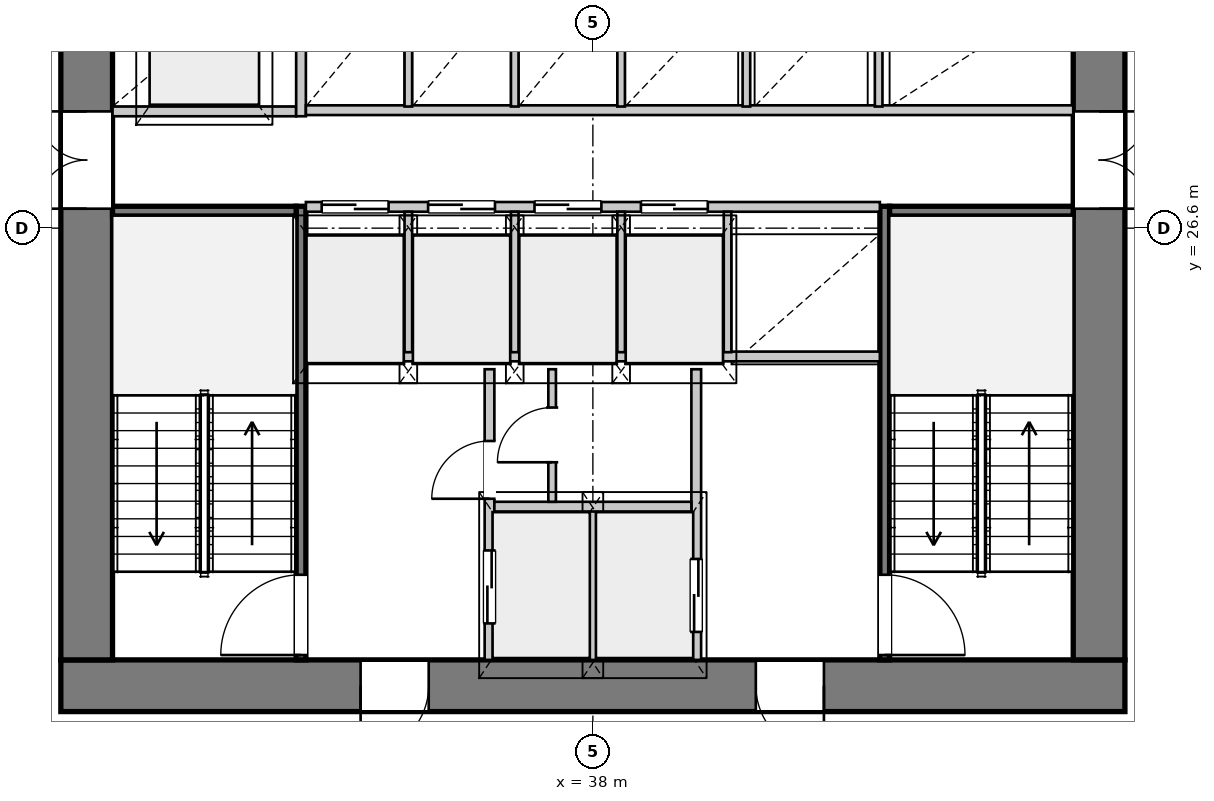
"""IFC4 building model, lengths in metres.
Left out: names, types, materials, properties, quantities, classifications, styles, units other than length and angle.
Written with IfcOpenShell. Run it as: python <this file> out.ifc"""

import sys

from ifc_helpers import new_model, si_unit, direction, frame, frame_2d, origin, place, context, subcontext, project, spatial, rectangle, extrude, source, transform, mapped, element, fill, save


model = new_model("IFC4")
c1 = context("Model", 3, precision=1e-05, world=origin(), true_north=direction((0.0, 1.0)))
c2 = subcontext(c1, "Body", "Model", "MODEL_VIEW")
j1 = project(units=[si_unit("LENGTHUNIT", "METRE"), si_unit("PLANEANGLEUNIT", "RADIAN")], contexts=[c1])
p1 = place(None, origin())
s1 = spatial("IfcSite", under=j1, at=p1, CompositionType="ELEMENT")
p2 = place(p1, origin())
s2 = spatial("IfcBuilding", under=s1, at=p2, CompositionType="ELEMENT")
p3 = place(p2, frame((0.0, 0.0, 47.05)))
s3 = spatial("IfcBuildingStorey", under=s2, at=p3, CompositionType="ELEMENT", Elevation=47.05)
p4 = place(p3, frame((46.75, 19.075, 0.0), z_axis=(0.0, 0.0, 1.0), x_axis=(-1.0, 0.0, 0.0)))
e1 = element("IfcWall", 1, at=p4, inside=s3, PredefinedType="SHEAR", context=c2, shape_type="SweptSolid", body=[
    extrude(rectangle(XDim=17.5, YDim=0.85, at=frame_2d((8.75, 0.0))), origin(), (0.0, 0.0, 1.0), 3.3),
])
p5 = place(p4, frame((4.95, 0.0, 0.0)))
e2 = element("IfcOpeningElement", 2, at=p5, cuts=e1, PredefinedType="OPENING", context=c2, shape_type="SweptSolid", body=[
    extrude(rectangle(XDim=1.12, YDim=2.25, at=frame_2d((0.56, 1.125))), frame((0.0, 0.435, 0.0), z_axis=(0.0, -1.0, 0.0), x_axis=(1.0, 0.0, 0.0)), (0.0, 0.0, 1.0), 0.87),
])
p6 = place(p4, frame((11.45, 0.0, 0.0)))
e3 = element("IfcOpeningElement", 3, at=p6, cuts=e1, PredefinedType="OPENING", context=c2, shape_type="SweptSolid", body=[
    extrude(rectangle(XDim=1.12, YDim=2.25, at=frame_2d((0.56, 1.125))), frame((0.0, 0.435, 0.0), z_axis=(0.0, -1.0, 0.0), x_axis=(1.0, 0.0, 0.0)), (0.0, 0.0, 1.0), 0.87),
])
p7 = place(p3, frame((29.675, 19.5, 0.0), z_axis=(0.0, 0.0, 1.0), x_axis=(0.0, 1.0, 0.0)))
e4 = element("IfcWall", 4, at=p7, inside=s3, PredefinedType="SHEAR", context=c2, shape_type="SweptSolid", body=[
    extrude(rectangle(XDim=14.2, YDim=0.85, at=frame_2d((7.1, 0.0))), origin(), (0.0, 0.0, 1.0), 3.3),
])
p8 = place(p7, frame((7.42, 0.0, 0.0)))
e5 = element("IfcOpeningElement", 5, at=p8, cuts=e4, PredefinedType="OPENING", context=c2, shape_type="SweptSolid", body=[
    extrude(rectangle(XDim=1.6, YDim=2.2, at=frame_2d((0.8, 1.1))), frame((0.0, 0.435, 0.0), z_axis=(0.0, -1.0, 0.0), x_axis=(1.0, 0.0, 0.0)), (0.0, 0.0, 1.0), 0.87),
])
p9 = place(p3, frame((46.325, 33.7, 0.0), z_axis=(0.0, 0.0, 1.0), x_axis=(0.0, -1.0, 0.0)))
e6 = element("IfcWall", 6, at=p9, inside=s3, PredefinedType="SHEAR", context=c2, shape_type="SweptSolid", body=[
    extrude(rectangle(XDim=14.2, YDim=0.85, at=frame_2d((7.1, 0.0))), origin(), (0.0, 0.0, 1.0), 3.3),
])
p10 = place(p9, frame((5.18, 0.0, 0.0)))
e7 = element("IfcOpeningElement", 7, at=p10, cuts=e6, PredefinedType="OPENING", context=c2, shape_type="SweptSolid", body=[
    extrude(rectangle(XDim=1.6, YDim=2.2, at=frame_2d((0.8, 1.1))), frame((0.0, 0.435, 0.0), z_axis=(0.0, -1.0, 0.0), x_axis=(1.0, 0.0, 0.0)), (0.0, 0.0, 1.0), 0.87),
])
p11 = place(p3, frame((33.2, 19.5, 0.0), z_axis=(0.0, 0.0, 1.0), x_axis=(0.0, 1.0, 0.0)))
e8 = element("IfcWall", 8, at=p11, inside=s3, PredefinedType="PARTITIONING", context=c2, shape_type="SweptSolid", body=[
    extrude(rectangle(XDim=7.46, YDim=0.16, at=frame_2d((3.73, 0.0))), origin(), (0.0, 0.0, 1.0), 3.3),
])
p12 = place(p11, frame((0.08, 0.0, 0.0)))
e9 = element("IfcOpeningElement", 9, at=p12, cuts=e8, PredefinedType="OPENING", context=c2, shape_type="SweptSolid", body=[
    extrude(rectangle(XDim=1.32, YDim=2.2, at=frame_2d((0.66, 1.1))), frame((0.0, 0.09, 0.0), z_axis=(0.0, -1.0, 0.0), x_axis=(1.0, 0.0, 0.0)), (0.0, 0.0, 1.0), 0.18),
])
p13 = place(p3, frame((30.1, 26.88, 0.0), z_axis=(0.0, 0.0, 1.0), x_axis=(1.0, 0.0, 0.0)))
e10 = element("IfcWall", 10, at=p13, inside=s3, PredefinedType="PARTITIONING", context=c2, shape_type="SweptSolid", body=[
    extrude(rectangle(XDim=3.02, YDim=0.16, at=frame_2d((1.51, 0.0))), origin(), (0.0, 0.0, 1.0), 3.3),
])
p14 = place(p3, frame((42.8, 26.96, 0.0), z_axis=(0.0, 0.0, 1.0), x_axis=(0.0, -1.0, 0.0)))
e11 = element("IfcWall", 11, at=p14, inside=s3, PredefinedType="PARTITIONING", context=c2, shape_type="SweptSolid", body=[
    extrude(rectangle(XDim=7.46, YDim=0.16, at=frame_2d((3.73, 0.0))), origin(), (0.0, 0.0, 1.0), 3.3),
])
p15 = place(p14, frame((6.06, 0.0, 0.0)))
e12 = element("IfcOpeningElement", 12, at=p15, cuts=e11, PredefinedType="OPENING", context=c2, shape_type="SweptSolid", body=[
    extrude(rectangle(XDim=1.32, YDim=2.2, at=frame_2d((0.66, 1.1))), frame((0.0, 0.09, 0.0), z_axis=(0.0, -1.0, 0.0), x_axis=(1.0, 0.0, 0.0)), (0.0, 0.0, 1.0), 0.18),
])
p16 = place(p3, frame((42.88, 26.88, 0.0), z_axis=(0.0, 0.0, 1.0), x_axis=(1.0, 0.0, 0.0)))
e13 = element("IfcWall", 13, at=p16, inside=s3, PredefinedType="PARTITIONING", context=c2, shape_type="SweptSolid", body=[
    extrude(rectangle(XDim=3.02, YDim=0.16, at=frame_2d((1.51, 0.0))), origin(), (0.0, 0.0, 1.0), 3.3),
])
p17 = place(p3, frame((36.3, 19.5, 0.0), z_axis=(0.0, 0.0, 1.0), x_axis=(0.0, 1.0, 0.0)))
e14 = element("IfcWall", 14, at=p17, inside=s3, PredefinedType="PARTITIONING", context=c2, shape_type="SweptSolid", body=[
    extrude(rectangle(XDim=4.78, YDim=0.16, at=frame_2d((2.39, 0.0))), origin(), (0.0, 0.0, 1.0), 3.3),
])
p18 = place(p17, frame((0.6, 0.0, 0.0)))
e15 = element("IfcOpeningElement", 15, at=p18, cuts=e14, PredefinedType="OPENING", context=c2, shape_type="SweptSolid", body=[
    extrude(rectangle(XDim=1.2, YDim=2.2, at=frame_2d((0.6, 1.1))), frame((0.0, 0.09, 0.0), z_axis=(0.0, -1.0, 0.0), x_axis=(1.0, 0.0, 0.0)), (0.0, 0.0, 1.0), 0.18),
])
p19 = place(p17, frame((2.65, 0.0, 0.0)))
e16 = element("IfcOpeningElement", 16, at=p19, cuts=e14, PredefinedType="OPENING", context=c2, shape_type="SweptSolid", body=[
    extrude(rectangle(XDim=0.95, YDim=2.1, at=frame_2d((0.475, 1.05))), frame((0.0, 0.09, 0.0), z_axis=(0.0, -1.0, 0.0), x_axis=(1.0, 0.0, 0.0)), (0.0, 0.0, 1.0), 0.18),
])
p20 = place(p3, frame((39.7, 24.28, 0.0), z_axis=(0.0, 0.0, 1.0), x_axis=(0.0, -1.0, 0.0)))
e17 = element("IfcWall", 17, at=p20, inside=s3, PredefinedType="PARTITIONING", context=c2, shape_type="SweptSolid", body=[
    extrude(rectangle(XDim=4.78, YDim=0.16, at=frame_2d((2.39, 0.0))), origin(), (0.0, 0.0, 1.0), 3.3),
])
p21 = place(p20, frame((3.12, 0.0, 0.0)))
e18 = element("IfcOpeningElement", 18, at=p21, cuts=e17, PredefinedType="OPENING", context=c2, shape_type="SweptSolid", body=[
    extrude(rectangle(XDim=1.2, YDim=2.2, at=frame_2d((0.6, 1.1))), frame((0.0, 0.09, 0.0), z_axis=(0.0, -1.0, 0.0), x_axis=(1.0, 0.0, 0.0)), (0.0, 0.0, 1.0), 0.18),
])
p22 = place(p3, frame((38.0, 19.5, 0.0), z_axis=(0.0, 0.0, 1.0), x_axis=(0.0, 1.0, 0.0)))
e19 = element("IfcWall", 19, at=p22, inside=s3, PredefinedType="PARTITIONING", context=c2, shape_type="SweptSolid", body=[
    extrude(rectangle(XDim=2.46, YDim=0.125, at=frame_2d((1.23, 0.0))), origin(), (0.0, 0.0, 1.0), 3.3),
])
p23 = place(p3, frame((36.38, 22.02, 0.0), z_axis=(0.0, 0.0, 1.0), x_axis=(1.0, 0.0, 0.0)))
e20 = element("IfcWall", 20, at=p23, inside=s3, PredefinedType="PARTITIONING", context=c2, shape_type="SweptSolid", body=[
    extrude(rectangle(XDim=3.24, YDim=0.16, at=frame_2d((1.62, 0.0))), origin(), (0.0, 0.0, 1.0), 3.3),
])
p24 = place(p3, frame((33.28, 24.49, 0.0), z_axis=(0.0, 0.0, 1.0), x_axis=(1.0, 0.0, 0.0)))
e21 = element("IfcWall", 21, at=p24, inside=s3, PredefinedType="PARTITIONING", context=c2, shape_type="SweptSolid", body=[
    extrude(rectangle(XDim=9.44, YDim=0.16, at=frame_2d((4.72, 0.0))), origin(), (0.0, 0.0, 1.0), 3.3),
])
p25 = place(p3, frame((37.33, 22.1, 0.0), z_axis=(0.0, 0.0, 1.0), x_axis=(0.0, 1.0, 0.0)))
e22 = element("IfcWall", 22, at=p25, inside=s3, PredefinedType="PARTITIONING", context=c2, shape_type="SweptSolid", body=[
    extrude(rectangle(XDim=2.18, YDim=0.125, at=frame_2d((1.09, 0.0))), origin(), (0.0, 0.0, 1.0), 3.3),
])
p26 = place(p25, frame((0.65, 0.0, 0.0)))
e23 = element("IfcOpeningElement", 23, at=p26, cuts=e22, PredefinedType="OPENING", context=c2, shape_type="SweptSolid", body=[
    extrude(rectangle(XDim=0.9, YDim=2.1, at=frame_2d((0.45, 1.05))), frame((0.0, 0.073, 0.0), z_axis=(0.0, -1.0, 0.0), x_axis=(1.0, 0.0, 0.0)), (0.0, 0.0, 1.0), 0.145),
])
p27 = place(p3, frame((30.1, 28.52, 0.0), z_axis=(0.0, 0.0, 1.0), x_axis=(1.0, 0.0, 0.0)))
e24 = element("IfcWall", 24, at=p27, inside=s3, PredefinedType="PARTITIONING", context=c2, shape_type="SweptSolid", body=[
    extrude(rectangle(XDim=3.02, YDim=0.16, at=frame_2d((1.51, 0.0))), origin(), (0.0, 0.0, 1.0), 3.3),
])
p28 = place(p3, frame((33.2, 28.44, 0.0), z_axis=(0.0, 0.0, 1.0), x_axis=(0.0, 1.0, 0.0)))
e25 = element("IfcWall", 25, at=p28, inside=s3, PredefinedType="PARTITIONING", context=c2, shape_type="SweptSolid", body=[
    extrude(rectangle(XDim=5.26, YDim=0.16, at=frame_2d((2.63, 0.0))), origin(), (0.0, 0.0, 1.0), 3.3),
])
p29 = place(p3, frame((33.28, 26.95, 0.0), z_axis=(0.0, 0.0, 1.0), x_axis=(1.0, 0.0, 0.0)))
e26 = element("IfcWall", 26, at=p29, inside=s3, PredefinedType="PARTITIONING", context=c2, shape_type="SweptSolid", body=[
    extrude(rectangle(XDim=9.44, YDim=0.16, at=frame_2d((4.72, 0.0))), origin(), (0.0, 0.0, 1.0), 3.3),
])
p30 = place(p29, frame((0.26, 0.0, 0.0)))
e27 = element("IfcOpeningElement", 27, at=p30, cuts=e26, PredefinedType="OPENING", context=c2, shape_type="SweptSolid", body=[
    extrude(rectangle(XDim=1.1, YDim=2.2, at=frame_2d((0.55, 1.1))), frame((0.0, 0.09, 0.0), z_axis=(0.0, -1.0, 0.0), x_axis=(1.0, 0.0, 0.0)), (0.0, 0.0, 1.0), 0.18),
])
p31 = place(p29, frame((2.01, 0.0, 0.0)))
e28 = element("IfcOpeningElement", 28, at=p31, cuts=e26, PredefinedType="OPENING", context=c2, shape_type="SweptSolid", body=[
    extrude(rectangle(XDim=1.1, YDim=2.2, at=frame_2d((0.55, 1.1))), frame((0.0, 0.09, 0.0), z_axis=(0.0, -1.0, 0.0), x_axis=(1.0, 0.0, 0.0)), (0.0, 0.0, 1.0), 0.18),
])
p32 = place(p29, frame((3.76, 0.0, 0.0)))
e29 = element("IfcOpeningElement", 29, at=p32, cuts=e26, PredefinedType="OPENING", context=c2, shape_type="SweptSolid", body=[
    extrude(rectangle(XDim=1.1, YDim=2.2, at=frame_2d((0.55, 1.1))), frame((0.0, 0.09, 0.0), z_axis=(0.0, -1.0, 0.0), x_axis=(1.0, 0.0, 0.0)), (0.0, 0.0, 1.0), 0.18),
])
p33 = place(p29, frame((5.51, 0.0, 0.0)))
e30 = element("IfcOpeningElement", 30, at=p33, cuts=e26, PredefinedType="OPENING", context=c2, shape_type="SweptSolid", body=[
    extrude(rectangle(XDim=1.1, YDim=2.2, at=frame_2d((0.55, 1.1))), frame((0.0, 0.09, 0.0), z_axis=(0.0, -1.0, 0.0), x_axis=(1.0, 0.0, 0.0)), (0.0, 0.0, 1.0), 0.18),
])
for number, where, z_axis, x_axis in (
    (31, (34.965, 24.56, 0.0), (0.0, 0.0, 1.0), (0.0, 1.0, 0.0)),
    (32, (36.715, 24.56, 0.0), (0.0, 0.0, 1.0), (0.0, 1.0, 0.0)),
    (33, (38.465, 24.56, 0.0), (0.0, 0.0, 1.0), (0.0, 1.0, 0.0)),
    (34, (40.215, 24.56, 0.0), (0.0, 0.0, 1.0), (0.0, 1.0, 0.0)),
):
    element("IfcWall", number, at=place(p3, frame(where, z_axis=z_axis, x_axis=x_axis)), inside=s3, PredefinedType="PARTITIONING", context=c2, shape_type="SweptSolid", body=[
        extrude(rectangle(XDim=2.31, YDim=0.125, at=frame_2d((1.155, 0.0))), origin(), (0.0, 0.0, 1.0), 3.3),
    ])
p34 = place(p3, frame((33.28, 28.54, 0.0), z_axis=(0.0, 0.0, 1.0), x_axis=(1.0, 0.0, 0.0)))
e35 = element("IfcWall", 35, at=p34, inside=s3, PredefinedType="PARTITIONING", context=c2, shape_type="SweptSolid", body=[
    extrude(rectangle(XDim=12.62, YDim=0.16, at=frame_2d((6.31, 0.0))), origin(), (0.0, 0.0, 1.0), 3.3),
])
for number, where, z_axis, x_axis in (
    (36, (34.965, 28.6, 0.0), (0.0, 0.0, 1.0), (0.0, 1.0, 0.0)),
    (37, (36.715, 28.6, 0.0), (0.0, 0.0, 1.0), (0.0, 1.0, 0.0)),
    (38, (38.465, 28.6, 0.0), (0.0, 0.0, 1.0), (0.0, 1.0, 0.0)),
    (39, (40.525, 28.6, 0.0), (0.0, 0.0, 1.0), (0.0, 1.0, 0.0)),
    (40, (42.7, 28.6, 0.0), (0.0, 0.0, 1.0), (0.0, 1.0, 0.0)),
):
    element("IfcWall", number, at=place(p3, frame(where, z_axis=z_axis, x_axis=x_axis)), inside=s3, PredefinedType="PARTITIONING", context=c2, shape_type="SweptSolid", body=[
        extrude(rectangle(XDim=1.92, YDim=0.125, at=frame_2d((0.96, 0.0))), origin(), (0.0, 0.0, 1.0), 3.3),
    ])
m1 = source(origin(), c2, "Body", "SweptSolid", [
    extrude(rectangle(XDim=1.12, YDim=2.25, at=frame_2d((0.56, 1.125))), frame((0.0, 0.025, 0.0), z_axis=(0.0, -1.0, 0.0), x_axis=(1.0, 0.0, 0.0)), (0.0, 0.0, 1.0), 0.05),
])
p35 = place(p5, origin())
e41 = element("IfcDoor", 41, at=p35, inside=s3, OperationType="SINGLE_SWING_LEFT", PredefinedType="DOOR", context=c2, shape_type="MappedRepresentation", body=[
    mapped(m1, transform((0.0, 0.0, 0.0), x_axis=(1.0, 0.0, 0.0), y_axis=(0.0, 1.0, 0.0), z_axis=(0.0, 0.0, 1.0), scale=1.0)),
])
fill(e2, e41)
p36 = place(p6, origin())
e42 = element("IfcDoor", 42, at=p36, inside=s3, OperationType="SINGLE_SWING_RIGHT", PredefinedType="DOOR", context=c2, shape_type="MappedRepresentation", body=[
    mapped(m1, transform((0.0, 0.0, 0.0), x_axis=(1.0, 0.0, 0.0), y_axis=(0.0, 1.0, 0.0), z_axis=(0.0, 0.0, 1.0), scale=1.0)),
])
fill(e3, e42)
m2 = source(origin(), c2, "Body", "SweptSolid", [
    extrude(rectangle(XDim=1.6, YDim=2.2, at=frame_2d((0.8, 1.1))), frame((0.0, 0.025, 0.0), z_axis=(0.0, -1.0, 0.0), x_axis=(1.0, 0.0, 0.0)), (0.0, 0.0, 1.0), 0.05),
])
p37 = place(p8, origin())
e43 = element("IfcDoor", 43, at=p37, inside=s3, OperationType="DOUBLE_DOOR_SINGLE_SWING", PredefinedType="DOOR", context=c2, shape_type="MappedRepresentation", body=[
    mapped(m2, transform((0.0, 0.0, 0.0), x_axis=(1.0, 0.0, 0.0), y_axis=(0.0, 1.0, 0.0), z_axis=(0.0, 0.0, 1.0), scale=1.0)),
])
fill(e5, e43)
p38 = place(p10, origin())
e44 = element("IfcDoor", 44, at=p38, inside=s3, OperationType="DOUBLE_DOOR_SINGLE_SWING", PredefinedType="DOOR", context=c2, shape_type="MappedRepresentation", body=[
    mapped(m2, transform((0.0, 0.0, 0.0), x_axis=(1.0, 0.0, 0.0), y_axis=(0.0, 1.0, 0.0), z_axis=(0.0, 0.0, 1.0), scale=1.0)),
])
fill(e7, e44)
m3 = source(origin(), c2, "Body", "SweptSolid", [
    extrude(rectangle(XDim=1.32, YDim=2.2, at=frame_2d((0.66, 1.1))), frame((0.0, 0.025, 0.0), z_axis=(0.0, -1.0, 0.0), x_axis=(1.0, 0.0, 0.0)), (0.0, 0.0, 1.0), 0.05),
])
p39 = place(p12, origin())
e45 = element("IfcDoor", 45, at=p39, inside=s3, OperationType="SINGLE_SWING_LEFT", PredefinedType="DOOR", context=c2, shape_type="MappedRepresentation", body=[
    mapped(m3, transform((0.0, 0.0, 0.0), x_axis=(1.0, 0.0, 0.0), y_axis=(0.0, 1.0, 0.0), z_axis=(0.0, 0.0, 1.0), scale=1.0)),
])
fill(e9, e45)
p40 = place(p15, origin())
e46 = element("IfcDoor", 46, at=p40, inside=s3, OperationType="SINGLE_SWING_RIGHT", PredefinedType="DOOR", context=c2, shape_type="MappedRepresentation", body=[
    mapped(m3, transform((0.0, 0.0, 0.0), x_axis=(1.0, 0.0, 0.0), y_axis=(0.0, 1.0, 0.0), z_axis=(0.0, 0.0, 1.0), scale=1.0)),
])
fill(e12, e46)
m4 = source(origin(), c2, "Body", "SweptSolid", [
    extrude(rectangle(XDim=1.2, YDim=2.2, at=frame_2d((0.6, 1.1))), frame((0.0, 0.025, 0.0), z_axis=(0.0, -1.0, 0.0), x_axis=(1.0, 0.0, 0.0)), (0.0, 0.0, 1.0), 0.05),
])
p41 = place(p18, origin())
e47 = element("IfcDoor", 47, at=p41, inside=s3, OperationType="DOUBLE_DOOR_SLIDING", PredefinedType="DOOR", context=c2, shape_type="MappedRepresentation", body=[
    mapped(m4, transform((0.0, 0.0, 0.0), x_axis=(1.0, 0.0, 0.0), y_axis=(0.0, 1.0, 0.0), z_axis=(0.0, 0.0, 1.0), scale=1.0)),
])
fill(e15, e47)
m5 = source(origin(), c2, "Body", "SweptSolid", [
    extrude(rectangle(XDim=0.95, YDim=2.1, at=frame_2d((0.475, 1.05))), frame((0.0, 0.025, 0.0), z_axis=(0.0, -1.0, 0.0), x_axis=(1.0, 0.0, 0.0)), (0.0, 0.0, 1.0), 0.05),
])
p42 = place(p19, origin())
e48 = element("IfcDoor", 48, at=p42, inside=s3, OperationType="SINGLE_SWING_LEFT", PredefinedType="DOOR", context=c2, shape_type="MappedRepresentation", body=[
    mapped(m5, transform((0.0, 0.0, 0.0), x_axis=(1.0, 0.0, 0.0), y_axis=(0.0, 1.0, 0.0), z_axis=(0.0, 0.0, 1.0), scale=1.0)),
])
fill(e16, e48)
m6 = source(origin(), c2, "Body", "SweptSolid", [
    extrude(rectangle(XDim=0.9, YDim=2.1, at=frame_2d((0.45, 1.05))), frame((0.0, 0.025, 0.0), z_axis=(0.0, -1.0, 0.0), x_axis=(1.0, 0.0, 0.0)), (0.0, 0.0, 1.0), 0.05),
])
p43 = place(p26, origin())
e49 = element("IfcDoor", 49, at=p43, inside=s3, OperationType="SINGLE_SWING_LEFT", PredefinedType="DOOR", context=c2, shape_type="MappedRepresentation", body=[
    mapped(m6, transform((0.0, 0.0, 0.0), x_axis=(1.0, 0.0, 0.0), y_axis=(0.0, 1.0, 0.0), z_axis=(0.0, 0.0, 1.0), scale=1.0)),
])
fill(e23, e49)
p44 = place(p21, origin())
e50 = element("IfcDoor", 50, at=p44, inside=s3, OperationType="DOUBLE_DOOR_SLIDING", PredefinedType="DOOR", context=c2, shape_type="MappedRepresentation", body=[
    mapped(m4, transform((0.0, 0.0, 0.0), x_axis=(1.0, 0.0, 0.0), y_axis=(0.0, 1.0, 0.0), z_axis=(0.0, 0.0, 1.0), scale=1.0)),
])
fill(e18, e50)
m7 = source(origin(), c2, "Body", "SweptSolid", [
    extrude(rectangle(XDim=1.1, YDim=2.2, at=frame_2d((0.55, 1.1))), frame((0.0, 0.025, 0.0), z_axis=(0.0, -1.0, 0.0), x_axis=(1.0, 0.0, 0.0)), (0.0, 0.0, 1.0), 0.05),
])
p45 = place(p30, origin())
e51 = element("IfcDoor", 51, at=p45, inside=s3, OperationType="DOUBLE_DOOR_SLIDING", PredefinedType="DOOR", context=c2, shape_type="MappedRepresentation", body=[
    mapped(m7, transform((0.0, 0.0, 0.0), x_axis=(1.0, 0.0, 0.0), y_axis=(0.0, 1.0, 0.0), z_axis=(0.0, 0.0, 1.0), scale=1.0)),
])
fill(e27, e51)
p46 = place(p31, origin())
e52 = element("IfcDoor", 52, at=p46, inside=s3, OperationType="DOUBLE_DOOR_SLIDING", PredefinedType="DOOR", context=c2, shape_type="MappedRepresentation", body=[
    mapped(m7, transform((0.0, 0.0, 0.0), x_axis=(1.0, 0.0, 0.0), y_axis=(0.0, 1.0, 0.0), z_axis=(0.0, 0.0, 1.0), scale=1.0)),
])
fill(e28, e52)
p47 = place(p32, origin())
e53 = element("IfcDoor", 53, at=p47, inside=s3, OperationType="DOUBLE_DOOR_SLIDING", PredefinedType="DOOR", context=c2, shape_type="MappedRepresentation", body=[
    mapped(m7, transform((0.0, 0.0, 0.0), x_axis=(1.0, 0.0, 0.0), y_axis=(0.0, 1.0, 0.0), z_axis=(0.0, 0.0, 1.0), scale=1.0)),
])
fill(e29, e53)
p48 = place(p33, origin())
e54 = element("IfcDoor", 54, at=p48, inside=s3, OperationType="DOUBLE_DOOR_SLIDING", PredefinedType="DOOR", context=c2, shape_type="MappedRepresentation", body=[
    mapped(m7, transform((0.0, 0.0, 0.0), x_axis=(1.0, 0.0, 0.0), y_axis=(0.0, 1.0, 0.0), z_axis=(0.0, 0.0, 1.0), scale=1.0)),
])
fill(e30, e54)
save(model, sys.argv[1])
